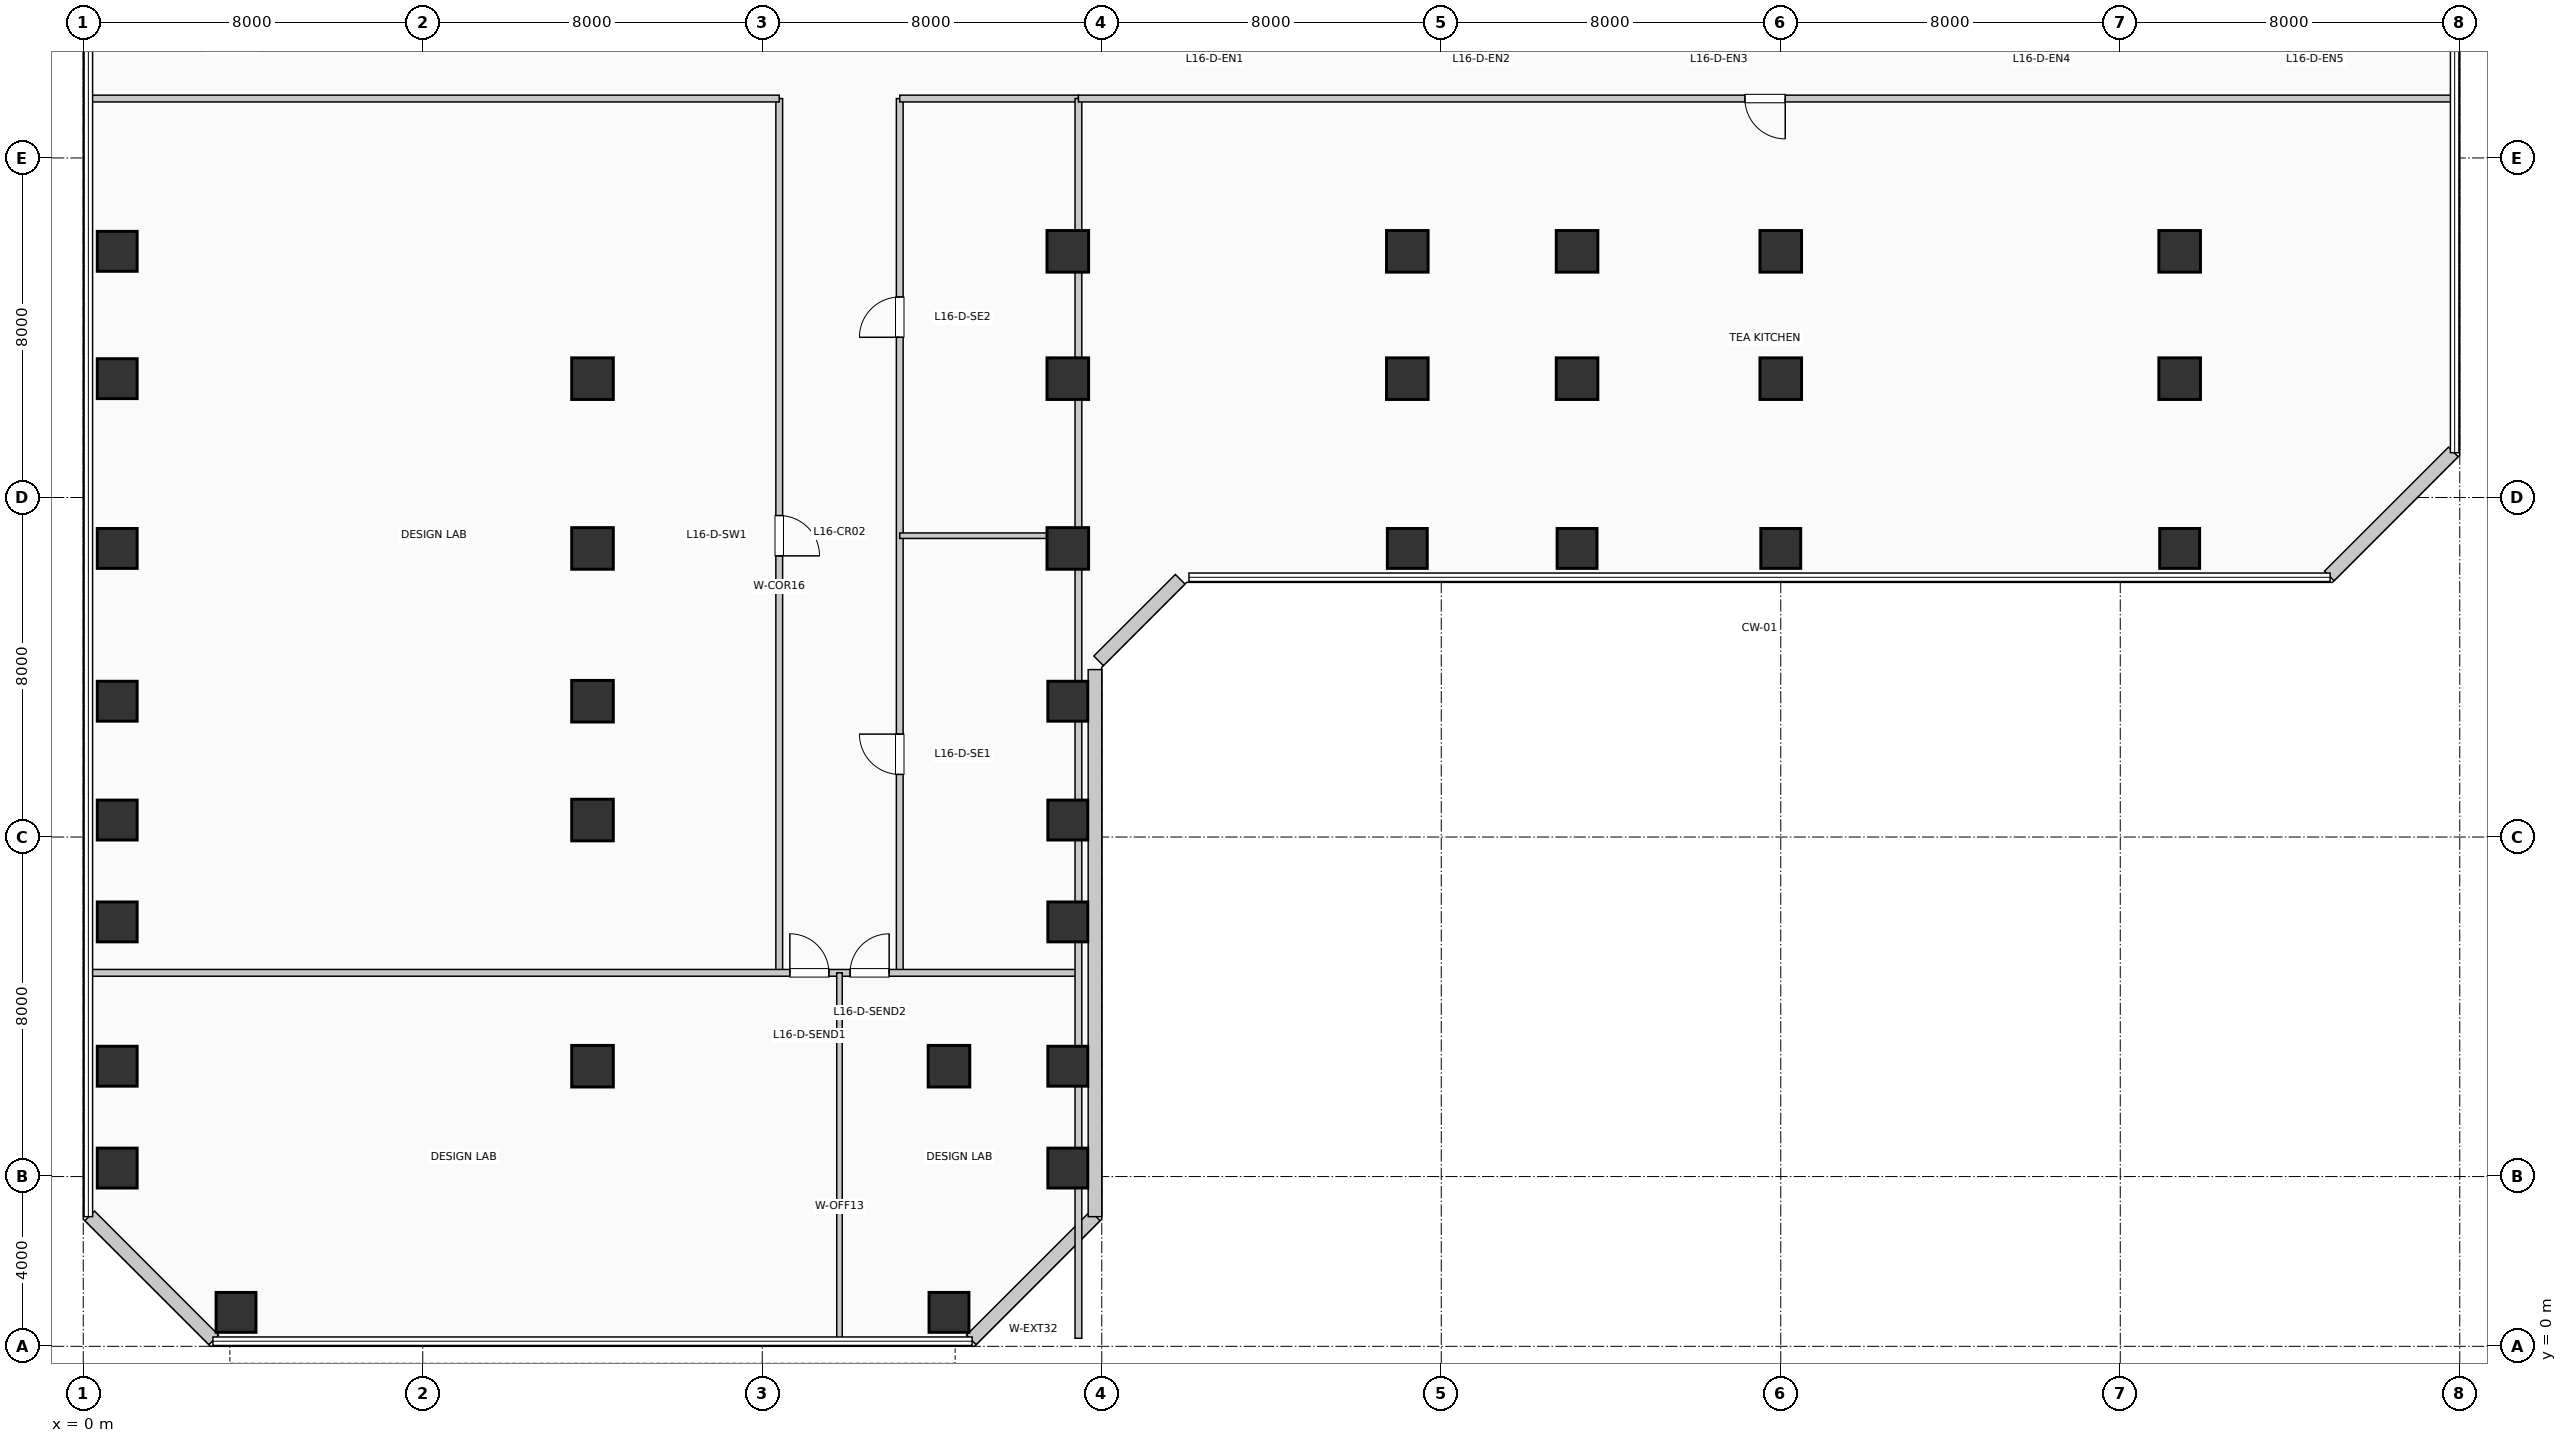
"""IFC4 building model, lengths in metres.
Left out: names, types, materials, properties, quantities, classifications, styles, units other than length and angle.
Written with IfcOpenShell. Run it as: python <this file> out.ifc"""

import sys

from ifc_helpers import new_model, si_unit, direction, frame, frame_2d, origin, origin_2d, place, context, subcontext, project, spatial, rectangle, extrude, element, fill, save


model = new_model("IFC4")
c1 = context("Model", 3, precision=1e-05, world=origin(), true_north=direction((0.0, 1.0)))
c2 = subcontext(c1, "Body", "Model", "MODEL_VIEW")
j1 = project(units=[si_unit("LENGTHUNIT", "METRE"), si_unit("PLANEANGLEUNIT", "RADIAN")], contexts=[c1])
p1 = place(None, origin())
s1 = spatial("IfcSite", under=j1, at=p1, CompositionType="ELEMENT")
p2 = place(p1, origin())
s2 = spatial("IfcBuilding", under=s1, at=p2, CompositionType="ELEMENT")
p3 = place(p2, frame((0.0, 0.0, 69.96)))
s3 = spatial("IfcBuildingStorey", under=s2, at=p3, CompositionType="ELEMENT", Elevation=69.96)
for number, where, z_axis, x_axis in (
    (1, (0.8, 4.2, 0.0), (0.0, 0.0, 1.0), (1.0, 0.0, 0.0)),
    (2, (0.8, 6.6, 0.0), (0.0, 0.0, 1.0), (1.0, 0.0, 0.0)),
    (3, (0.8, 10.0, 0.0), (0.0, 0.0, 1.0), (1.0, 0.0, 0.0)),
    (4, (0.8, 12.4, 0.0), (0.0, 0.0, 1.0), (1.0, 0.0, 0.0)),
    (5, (0.8, 15.2, 0.0), (0.0, 0.0, 1.0), (1.0, 0.0, 0.0)),
    (6, (0.8, 18.8, 0.0), (0.0, 0.0, 1.0), (1.0, 0.0, 0.0)),
    (7, (0.8, 22.8, 0.0), (0.0, 0.0, 1.0), (1.0, 0.0, 0.0)),
    (8, (0.8, 25.8, 0.0), (0.0, 0.0, 1.0), (1.0, 0.0, 0.0)),
    (9, (3.6, 0.8, 0.0), (0.0, 0.0, 1.0), (1.0, 0.0, 0.0)),
):
    element("IfcColumn", number, at=place(p3, frame(where, z_axis=z_axis, x_axis=x_axis)), inside=s3, PredefinedType="COLUMN", context=c2, shape_type="SweptSolid", body=[
        extrude(rectangle(XDim=0.94, YDim=0.94, at=origin_2d()), origin(), (0.0, 0.0, 1.0), 3.96),
    ])
for number, where, z_axis, x_axis in (
    (10, (12.0, 6.6, 0.0), (0.0, 0.0, 1.0), (1.0, 0.0, 0.0)),
    (11, (12.0, 12.4, 0.0), (0.0, 0.0, 1.0), (1.0, 0.0, 0.0)),
    (12, (12.0, 15.2, 0.0), (0.0, 0.0, 1.0), (1.0, 0.0, 0.0)),
    (13, (12.0, 18.8, 0.0), (0.0, 0.0, 1.0), (1.0, 0.0, 0.0)),
    (14, (12.0, 22.8, 0.0), (0.0, 0.0, 1.0), (1.0, 0.0, 0.0)),
):
    element("IfcColumn", number, at=place(p3, frame(where, z_axis=z_axis, x_axis=x_axis)), inside=s3, PredefinedType="COLUMN", context=c2, shape_type="SweptSolid", body=[
        extrude(rectangle(XDim=0.98, YDim=0.98, at=origin_2d()), origin(), (0.0, 0.0, 1.0), 3.96),
    ])
p4 = place(p3, frame((20.4, 0.8, 0.0), z_axis=(0.0, 0.0, 1.0), x_axis=(1.0, 0.0, 0.0)))
e15 = element("IfcColumn", 15, at=p4, inside=s3, PredefinedType="COLUMN", context=c2, shape_type="SweptSolid", body=[
    extrude(rectangle(XDim=0.94, YDim=0.94, at=origin_2d()), origin(), (0.0, 0.0, 1.0), 3.96),
])
p5 = place(p3, frame((20.4, 6.6, 0.0), z_axis=(0.0, 0.0, 1.0), x_axis=(1.0, 0.0, 0.0)))
e16 = element("IfcColumn", 16, at=p5, inside=s3, PredefinedType="COLUMN", context=c2, shape_type="SweptSolid", body=[
    extrude(rectangle(XDim=0.98, YDim=0.98, at=origin_2d()), origin(), (0.0, 0.0, 1.0), 3.96),
])
for number, where, z_axis, x_axis in (
    (17, (23.2, 4.2, 0.0), (0.0, 0.0, 1.0), (1.0, 0.0, 0.0)),
    (18, (23.2, 6.6, 0.0), (0.0, 0.0, 1.0), (1.0, 0.0, 0.0)),
    (19, (23.2, 10.0, 0.0), (0.0, 0.0, 1.0), (1.0, 0.0, 0.0)),
    (20, (23.2, 12.4, 0.0), (0.0, 0.0, 1.0), (1.0, 0.0, 0.0)),
    (21, (23.2, 15.2, 0.0), (0.0, 0.0, 1.0), (1.0, 0.0, 0.0)),
):
    element("IfcColumn", number, at=place(p3, frame(where, z_axis=z_axis, x_axis=x_axis)), inside=s3, PredefinedType="COLUMN", context=c2, shape_type="SweptSolid", body=[
        extrude(rectangle(XDim=0.94, YDim=0.94, at=origin_2d()), origin(), (0.0, 0.0, 1.0), 3.96),
    ])
for number, where, z_axis, x_axis in (
    (22, (23.2, 18.8, 0.0), (0.0, 0.0, 1.0), (1.0, 0.0, 0.0)),
    (23, (23.2, 22.8, 0.0), (0.0, 0.0, 1.0), (1.0, 0.0, 0.0)),
    (24, (23.2, 25.8, 0.0), (0.0, 0.0, 1.0), (1.0, 0.0, 0.0)),
):
    element("IfcColumn", number, at=place(p3, frame(where, z_axis=z_axis, x_axis=x_axis)), inside=s3, PredefinedType="COLUMN", context=c2, shape_type="SweptSolid", body=[
        extrude(rectangle(XDim=0.98, YDim=0.98, at=origin_2d()), origin(), (0.0, 0.0, 1.0), 3.96),
    ])
p6 = place(p3, frame((31.2, 18.8, 0.0), z_axis=(0.0, 0.0, 1.0), x_axis=(1.0, 0.0, 0.0)))
e25 = element("IfcColumn", 25, at=p6, inside=s3, PredefinedType="COLUMN", context=c2, shape_type="SweptSolid", body=[
    extrude(rectangle(XDim=0.94, YDim=0.94, at=origin_2d()), origin(), (0.0, 0.0, 1.0), 3.96),
])
for number, where, z_axis, x_axis in (
    (26, (31.2, 22.8, 0.0), (0.0, 0.0, 1.0), (1.0, 0.0, 0.0)),
    (27, (31.2, 25.8, 0.0), (0.0, 0.0, 1.0), (1.0, 0.0, 0.0)),
):
    element("IfcColumn", number, at=place(p3, frame(where, z_axis=z_axis, x_axis=x_axis)), inside=s3, PredefinedType="COLUMN", context=c2, shape_type="SweptSolid", body=[
        extrude(rectangle(XDim=0.98, YDim=0.98, at=origin_2d()), origin(), (0.0, 0.0, 1.0), 3.96),
    ])
p7 = place(p3, frame((35.2, 18.8, 0.0), z_axis=(0.0, 0.0, 1.0), x_axis=(1.0, 0.0, 0.0)))
e28 = element("IfcColumn", 28, at=p7, inside=s3, PredefinedType="COLUMN", context=c2, shape_type="SweptSolid", body=[
    extrude(rectangle(XDim=0.94, YDim=0.94, at=origin_2d()), origin(), (0.0, 0.0, 1.0), 3.96),
])
for number, where, z_axis, x_axis in (
    (29, (35.2, 22.8, 0.0), (0.0, 0.0, 1.0), (1.0, 0.0, 0.0)),
    (30, (35.2, 25.8, 0.0), (0.0, 0.0, 1.0), (1.0, 0.0, 0.0)),
):
    element("IfcColumn", number, at=place(p3, frame(where, z_axis=z_axis, x_axis=x_axis)), inside=s3, PredefinedType="COLUMN", context=c2, shape_type="SweptSolid", body=[
        extrude(rectangle(XDim=0.98, YDim=0.98, at=origin_2d()), origin(), (0.0, 0.0, 1.0), 3.96),
    ])
p8 = place(p3, frame((40.0, 18.8, 0.0), z_axis=(0.0, 0.0, 1.0), x_axis=(1.0, 0.0, 0.0)))
e31 = element("IfcColumn", 31, at=p8, inside=s3, PredefinedType="COLUMN", context=c2, shape_type="SweptSolid", body=[
    extrude(rectangle(XDim=0.94, YDim=0.94, at=origin_2d()), origin(), (0.0, 0.0, 1.0), 3.96),
])
for number, where, z_axis, x_axis in (
    (32, (40.0, 22.8, 0.0), (0.0, 0.0, 1.0), (1.0, 0.0, 0.0)),
    (33, (40.0, 25.8, 0.0), (0.0, 0.0, 1.0), (1.0, 0.0, 0.0)),
):
    element("IfcColumn", number, at=place(p3, frame(where, z_axis=z_axis, x_axis=x_axis)), inside=s3, PredefinedType="COLUMN", context=c2, shape_type="SweptSolid", body=[
        extrude(rectangle(XDim=0.98, YDim=0.98, at=origin_2d()), origin(), (0.0, 0.0, 1.0), 3.96),
    ])
p9 = place(p3, frame((49.4, 18.8, 0.0), z_axis=(0.0, 0.0, 1.0), x_axis=(1.0, 0.0, 0.0)))
e34 = element("IfcColumn", 34, at=p9, inside=s3, PredefinedType="COLUMN", context=c2, shape_type="SweptSolid", body=[
    extrude(rectangle(XDim=0.94, YDim=0.94, at=origin_2d()), origin(), (0.0, 0.0, 1.0), 3.96),
])
for number, where, z_axis, x_axis in (
    (35, (49.4, 22.8, 0.0), (0.0, 0.0, 1.0), (1.0, 0.0, 0.0)),
    (36, (49.4, 25.8, 0.0), (0.0, 0.0, 1.0), (1.0, 0.0, 0.0)),
):
    element("IfcColumn", number, at=place(p3, frame(where, z_axis=z_axis, x_axis=x_axis)), inside=s3, PredefinedType="COLUMN", context=c2, shape_type="SweptSolid", body=[
        extrude(rectangle(XDim=0.98, YDim=0.98, at=origin_2d()), origin(), (0.0, 0.0, 1.0), 3.96),
    ])
p10 = place(p3, frame((20.926, 0.152, 0.0), z_axis=(0.0, 0.0, 1.0), x_axis=(0.707106781187, 0.707106781187, 0.0)))
e37 = element("IfcWall", 37, at=p10, inside=s3, PredefinedType="SOLIDWALL", context=c2, shape_type="SweptSolid", body=[
    extrude(rectangle(XDim=4.133, YDim=0.32, at=frame_2d((2.066, 0.0))), origin(), (0.0, 0.0, 1.0), 3.71),
])
p11 = place(p3, frame((23.84, 3.055, 0.0), z_axis=(0.0, 0.0, 1.0), x_axis=(0.0, 1.0, 0.0)))
e38 = element("IfcWall", 38, at=p11, inside=s3, PredefinedType="SOLIDWALL", context=c2, shape_type="SweptSolid", body=[
    extrude(rectangle(XDim=12.89, YDim=0.32, at=frame_2d((6.445, 0.0))), origin(), (0.0, 0.0, 1.0), 3.71),
])
p12 = place(p3, frame((23.926, 16.152, 0.0), z_axis=(0.0, 0.0, 1.0), x_axis=(0.707106781187, 0.707106781187, 0.0)))
e39 = element("IfcWall", 39, at=p12, inside=s3, PredefinedType="SOLIDWALL", context=c2, shape_type="SweptSolid", body=[
    extrude(rectangle(XDim=2.718, YDim=0.32, at=frame_2d((1.359, 0.0))), origin(), (0.0, 0.0, 1.0), 3.71),
])
for number, where, z_axis, x_axis in (
    (40, (52.926, 18.152, 0.0), (0.0, 0.0, 1.0), (0.707, 0.707, 0.0)),
    (41, (0.152, 3.074, 0.0), (0.0, 0.0, 1.0), (0.707, -0.707, 0.0)),
):
    element("IfcWall", number, at=place(p3, frame(where, z_axis=z_axis, x_axis=x_axis)), inside=s3, PredefinedType="SOLIDWALL", context=c2, shape_type="SweptSolid", body=[
        extrude(rectangle(XDim=4.133, YDim=0.32, at=frame_2d((2.066, 0.0))), origin(), (0.0, 0.0, 1.0), 3.71),
    ])
p13 = place(p3, frame((16.4, 8.8, 0.0), z_axis=(0.0, 0.0, 1.0), x_axis=(0.0, 1.0, 0.0)))
e42 = element("IfcWall", 42, at=p13, inside=s3, PredefinedType="PARTITIONING", context=c2, shape_type="SweptSolid", body=[
    extrude(rectangle(XDim=20.6, YDim=0.16, at=frame_2d((10.3, 0.0))), origin(), (0.0, 0.0, 1.0), 3.71),
])
p14 = place(p13, frame((10.775, 0.0, 0.0), z_axis=(0.0, 0.0, 1.0), x_axis=(-1.0, 0.0, 0.0)))
e43 = element("IfcOpeningElement", 43, at=p14, cuts=e42, PredefinedType="OPENING", context=c2, shape_type="SweptSolid", body=[
    extrude(rectangle(XDim=0.95, YDim=2.15, at=frame_2d((0.475, 1.075))), frame((0.0, 0.09, 0.0), z_axis=(0.0, -1.0, 0.0), x_axis=(1.0, 0.0, 0.0)), (0.0, 0.0, 1.0), 0.18),
])
p15 = place(p3, frame((19.24, 8.8, 0.0), z_axis=(0.0, 0.0, 1.0), x_axis=(0.0, 1.0, 0.0)))
e44 = element("IfcWall", 44, at=p15, inside=s3, PredefinedType="PARTITIONING", context=c2, shape_type="SweptSolid", body=[
    extrude(rectangle(XDim=20.6, YDim=0.16, at=frame_2d((10.3, 0.0))), origin(), (0.0, 0.0, 1.0), 3.71),
])
p16 = place(p15, frame((4.675, 0.0, 0.0)))
e45 = element("IfcOpeningElement", 45, at=p16, cuts=e44, PredefinedType="OPENING", context=c2, shape_type="SweptSolid", body=[
    extrude(rectangle(XDim=0.95, YDim=2.15, at=frame_2d((0.475, 1.075))), frame((0.0, 0.09, 0.0), z_axis=(0.0, -1.0, 0.0), x_axis=(1.0, 0.0, 0.0)), (0.0, 0.0, 1.0), 0.18),
])
p17 = place(p15, frame((14.975, 0.0, 0.0)))
e46 = element("IfcOpeningElement", 46, at=p17, cuts=e44, PredefinedType="OPENING", context=c2, shape_type="SweptSolid", body=[
    extrude(rectangle(XDim=0.95, YDim=2.15, at=frame_2d((0.475, 1.075))), frame((0.0, 0.09, 0.0), z_axis=(0.0, -1.0, 0.0), x_axis=(1.0, 0.0, 0.0)), (0.0, 0.0, 1.0), 0.18),
])
p18 = place(p3, frame((0.19, 8.8, 0.0), z_axis=(0.0, 0.0, 1.0), x_axis=(1.0, 0.0, 0.0)))
e47 = element("IfcWall", 47, at=p18, inside=s3, PredefinedType="PARTITIONING", context=c2, shape_type="SweptSolid", body=[
    extrude(rectangle(XDim=23.26, YDim=0.16, at=frame_2d((11.63, 0.0))), origin(), (0.0, 0.0, 1.0), 3.71),
])
p19 = place(p18, frame((16.46, 0.0, 0.0)))
e48 = element("IfcOpeningElement", 48, at=p19, cuts=e47, PredefinedType="OPENING", context=c2, shape_type="SweptSolid", body=[
    extrude(rectangle(XDim=0.92, YDim=2.1, at=frame_2d((0.46, 1.05))), frame((0.0, 0.09, 0.0), z_axis=(0.0, -1.0, 0.0), x_axis=(1.0, 0.0, 0.0)), (0.0, 0.0, 1.0), 0.18),
])
p20 = place(p18, frame((17.88, 0.0, 0.0)))
e49 = element("IfcOpeningElement", 49, at=p20, cuts=e47, PredefinedType="OPENING", context=c2, shape_type="SweptSolid", body=[
    extrude(rectangle(XDim=0.92, YDim=2.1, at=frame_2d((0.46, 1.05))), frame((0.0, 0.09, 0.0), z_axis=(0.0, -1.0, 0.0), x_axis=(1.0, 0.0, 0.0)), (0.0, 0.0, 1.0), 0.18),
])
p21 = place(p3, frame((0.19, 29.4, 0.0), z_axis=(0.0, 0.0, 1.0), x_axis=(1.0, 0.0, 0.0)))
e50 = element("IfcWall", 50, at=p21, inside=s3, PredefinedType="PARTITIONING", context=c2, shape_type="SweptSolid", body=[
    extrude(rectangle(XDim=16.21, YDim=0.16, at=frame_2d((8.105, 0.0))), origin(), (0.0, 0.0, 1.0), 3.365),
])
p22 = place(p3, frame((19.24, 29.4, 0.0), z_axis=(0.0, 0.0, 1.0), x_axis=(1.0, 0.0, 0.0)))
e51 = element("IfcWall", 51, at=p22, inside=s3, PredefinedType="PARTITIONING", context=c2, shape_type="SweptSolid", body=[
    extrude(rectangle(XDim=4.21, YDim=0.16, at=frame_2d((2.105, 0.0))), origin(), (0.0, 0.0, 1.0), 3.71),
])
p23 = place(p3, frame((23.45, 0.19, 0.0), z_axis=(0.0, 0.0, 1.0), x_axis=(0.0, 1.0, 0.0)))
e52 = element("IfcWall", 52, at=p23, inside=s3, PredefinedType="PARTITIONING", context=c2, shape_type="SweptSolid", body=[
    extrude(rectangle(XDim=29.21, YDim=0.16, at=frame_2d((14.605, 0.0))), origin(), (0.0, 0.0, 1.0), 2.995),
])
p24 = place(p3, frame((17.82, 0.19, 0.0), z_axis=(0.0, 0.0, 1.0), x_axis=(0.0, 1.0, 0.0)))
e53 = element("IfcWall", 53, at=p24, inside=s3, PredefinedType="PARTITIONING", context=c2, shape_type="SweptSolid", body=[
    extrude(rectangle(XDim=8.61, YDim=0.13, at=frame_2d((4.305, 0.0))), origin(), (0.0, 0.0, 1.0), 3.71),
])
p25 = place(p3, frame((19.24, 19.1, 0.0), z_axis=(0.0, 0.0, 1.0), x_axis=(1.0, 0.0, 0.0)))
e54 = element("IfcWall", 54, at=p25, inside=s3, PredefinedType="PARTITIONING", context=c2, shape_type="SweptSolid", body=[
    extrude(rectangle(XDim=4.21, YDim=0.13, at=frame_2d((2.105, 0.0))), origin(), (0.0, 0.0, 1.0), 2.995),
])
p26 = place(p3, frame((23.45, 29.4, 0.0), z_axis=(0.0, 0.0, 1.0), x_axis=(1.0, 0.0, 0.0)))
e55 = element("IfcWall", 55, at=p26, inside=s3, PredefinedType="PARTITIONING", context=c2, shape_type="SweptSolid", body=[
    extrude(rectangle(XDim=32.36, YDim=0.16, at=frame_2d((16.18, 0.0))), origin(), (0.0, 0.0, 1.0), 3.365),
])
p27 = place(p26, frame((16.655, 0.0, 0.0), z_axis=(0.0, 0.0, 1.0), x_axis=(-1.0, 0.0, 0.0)))
e56 = element("IfcOpeningElement", 56, at=p27, cuts=e55, PredefinedType="OPENING", context=c2, shape_type="SweptSolid", body=[
    extrude(rectangle(XDim=0.95, YDim=2.15, at=frame_2d((0.475, 1.075))), frame((0.0, 0.09, 0.0), z_axis=(0.0, -1.0, 0.0), x_axis=(1.0, 0.0, 0.0)), (0.0, 0.0, 1.0), 0.18),
])
p28 = place(p19, origin())
e57 = element("IfcDoor", 57, at=p28, inside=s3, OperationType="SINGLE_SWING_LEFT", PredefinedType="DOOR", context=c2, shape_type="SweptSolid", body=[
    extrude(rectangle(XDim=0.92, YDim=2.1, at=frame_2d((0.46, 1.05))), frame((0.0, 0.025, 0.0), z_axis=(0.0, -1.0, 0.0), x_axis=(1.0, 0.0, 0.0)), (0.0, 0.0, 1.0), 0.05),
])
fill(e48, e57)
p29 = place(p20, origin())
e58 = element("IfcDoor", 58, at=p29, inside=s3, OperationType="SINGLE_SWING_RIGHT", PredefinedType="DOOR", context=c2, shape_type="SweptSolid", body=[
    extrude(rectangle(XDim=0.92, YDim=2.1, at=frame_2d((0.46, 1.05))), frame((0.0, 0.025, 0.0), z_axis=(0.0, -1.0, 0.0), x_axis=(1.0, 0.0, 0.0)), (0.0, 0.0, 1.0), 0.05),
])
fill(e49, e58)
p30 = place(p14, origin())
e59 = element("IfcDoor", 59, at=p30, inside=s3, OperationType="SINGLE_SWING_LEFT", PredefinedType="DOOR", context=c2, shape_type="SweptSolid", body=[
    extrude(rectangle(XDim=0.95, YDim=2.15, at=frame_2d((0.475, 1.075))), frame((0.0, 0.025, 0.0), z_axis=(0.0, -1.0, 0.0), x_axis=(1.0, 0.0, 0.0)), (0.0, 0.0, 1.0), 0.05),
])
fill(e43, e59)
p31 = place(p16, origin())
e60 = element("IfcDoor", 60, at=p31, inside=s3, OperationType="SINGLE_SWING_RIGHT", PredefinedType="DOOR", context=c2, shape_type="SweptSolid", body=[
    extrude(rectangle(XDim=0.95, YDim=2.15, at=frame_2d((0.475, 1.075))), frame((0.0, 0.025, 0.0), z_axis=(0.0, -1.0, 0.0), x_axis=(1.0, 0.0, 0.0)), (0.0, 0.0, 1.0), 0.05),
])
fill(e45, e60)
p32 = place(p17, origin())
e61 = element("IfcDoor", 61, at=p32, inside=s3, OperationType="SINGLE_SWING_LEFT", PredefinedType="DOOR", context=c2, shape_type="SweptSolid", body=[
    extrude(rectangle(XDim=0.95, YDim=2.15, at=frame_2d((0.475, 1.075))), frame((0.0, 0.025, 0.0), z_axis=(0.0, -1.0, 0.0), x_axis=(1.0, 0.0, 0.0)), (0.0, 0.0, 1.0), 0.05),
])
fill(e46, e61)
p33 = place(p27, origin())
e62 = element("IfcDoor", 62, at=p33, inside=s3, OperationType="SINGLE_SWING_RIGHT", PredefinedType="DOOR", context=c2, shape_type="SweptSolid", body=[
    extrude(rectangle(XDim=0.95, YDim=2.15, at=frame_2d((0.475, 1.075))), frame((0.0, 0.025, 0.0), z_axis=(0.0, -1.0, 0.0), x_axis=(1.0, 0.0, 0.0)), (0.0, 0.0, 1.0), 0.05),
])
fill(e56, e62)
save(model, sys.argv[1])
